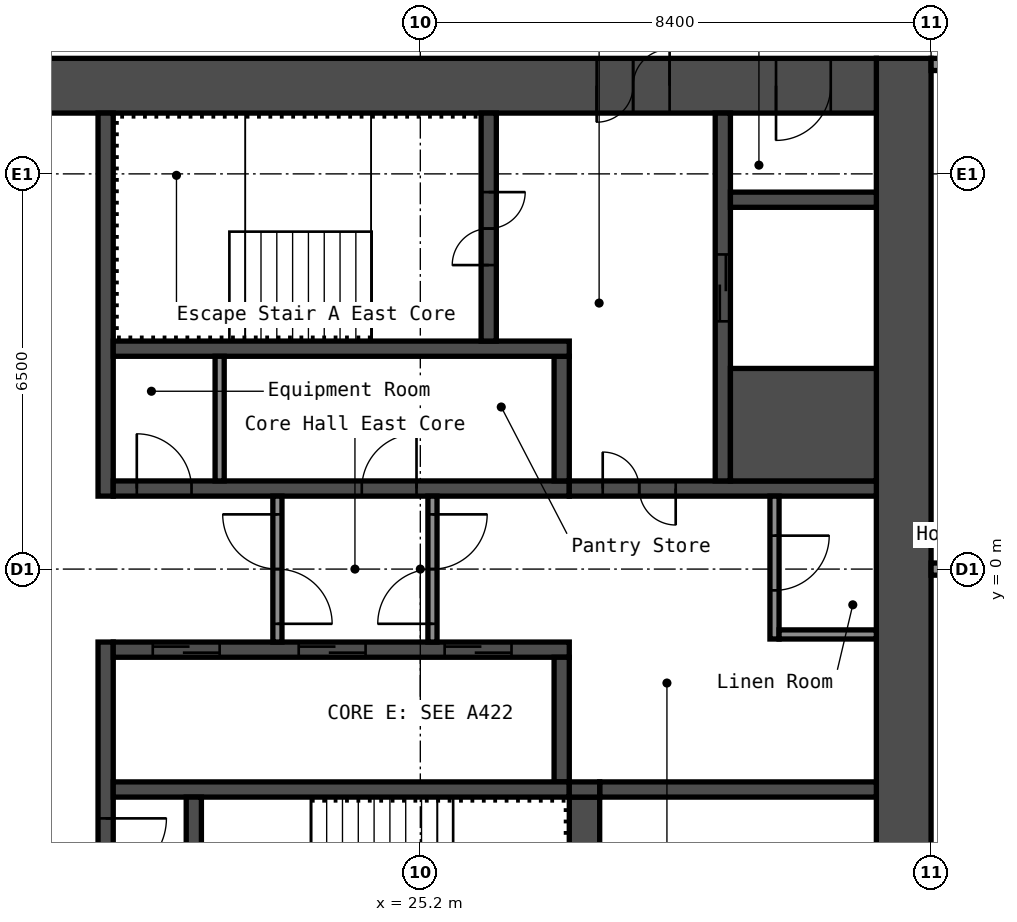
"""IFC4 building model, lengths in metres.
Left out: names, types, materials, properties, quantities, classifications, styles, units other than length and angle.
Written with IfcOpenShell. Run it as: python <this file> out.ifc"""

import sys

from ifc_helpers import new_model, si_unit, direction, frame, frame_2d, origin, place, context, subcontext, project, spatial, rectangle, extrude, element, fill, save


model = new_model("IFC4")
c1 = context("Model", 3, precision=1e-05, world=origin(), true_north=direction((0.0, 1.0)))
c2 = subcontext(c1, "Body", "Model", "MODEL_VIEW")
j1 = project(units=[si_unit("LENGTHUNIT", "METRE"), si_unit("PLANEANGLEUNIT", "RADIAN")], contexts=[c1])
p1 = place(None, origin())
s1 = spatial("IfcSite", under=j1, at=p1, CompositionType="ELEMENT")
p2 = place(p1, origin())
s2 = spatial("IfcBuilding", under=s1, at=p2, CompositionType="ELEMENT")
p3 = place(p2, frame((0.0, 0.0, 147.0)))
s3 = spatial("IfcBuildingStorey", under=s2, at=p3, CompositionType="ELEMENT", Elevation=147.0)
p4 = place(p3, frame((33.15, -8.4, 0.0), z_axis=(0.0, 0.0, 1.0), x_axis=(0.0, 1.0, 0.0)))
e1 = element("IfcWall", 1, at=p4, inside=s3, PredefinedType="SHEAR", context=c2, shape_type="SweptSolid", body=[
    extrude(rectangle(XDim=16.8, YDim=0.9, at=frame_2d((8.4, 0.0))), origin(), (0.0, 0.0, 1.0), 2.75),
])
p5 = place(p3, frame((17.7, 7.95, 0.0), z_axis=(0.0, 0.0, 1.0), x_axis=(1.0, 0.0, 0.0)))
e2 = element("IfcWall", 2, at=p5, inside=s3, PredefinedType="SHEAR", context=c2, shape_type="SweptSolid", body=[
    extrude(rectangle(XDim=15.0, YDim=0.9, at=frame_2d((7.5, 0.0))), origin(), (0.0, 0.0, 1.0), 2.75),
])
p6 = place(p5, frame((10.4, 0.0, 0.0)))
e3 = element("IfcOpeningElement", 3, at=p6, cuts=e2, PredefinedType="OPENING", context=c2, shape_type="SweptSolid", body=[
    extrude(rectangle(XDim=1.2, YDim=2.1, at=frame_2d((0.6, 1.05))), frame((0.0, 0.46, 0.0), z_axis=(0.0, -1.0, 0.0), x_axis=(1.0, 0.0, 0.0)), (0.0, 0.0, 1.0), 0.92),
])
p7 = place(p5, frame((13.35, 0.0, 0.0)))
e4 = element("IfcOpeningElement", 4, at=p7, cuts=e2, PredefinedType="OPENING", context=c2, shape_type="SweptSolid", body=[
    extrude(rectangle(XDim=0.9, YDim=2.1, at=frame_2d((0.45, 1.05))), frame((0.0, 0.46, 0.0), z_axis=(0.0, -1.0, 0.0), x_axis=(1.0, 0.0, 0.0)), (0.0, 0.0, 1.0), 0.92),
])
p8 = place(p3, frame((20.025, 1.2, 0.0), z_axis=(0.0, 0.0, 1.0), x_axis=(0.0, 1.0, 0.0)))
e5 = element("IfcWall", 5, at=p8, inside=s3, PredefinedType="SHEAR", context=c2, shape_type="SweptSolid", body=[
    extrude(rectangle(XDim=6.3, YDim=0.25, at=frame_2d((3.15, 0.0))), origin(), (0.0, 0.0, 1.0), 2.75),
])
p9 = place(p3, frame((20.025, -7.5, 0.0), z_axis=(0.0, 0.0, 1.0), x_axis=(0.0, 1.0, 0.0)))
e6 = element("IfcWall", 6, at=p9, inside=s3, PredefinedType="SHEAR", context=c2, shape_type="SweptSolid", body=[
    extrude(rectangle(XDim=6.3, YDim=0.25, at=frame_2d((3.15, 0.0))), origin(), (0.0, 0.0, 1.0), 2.75),
])
p10 = place(p9, frame((2.4, 0.0, 0.0)))
e7 = element("IfcOpeningElement", 7, at=p10, cuts=e6, PredefinedType="OPENING", context=c2, shape_type="SweptSolid", body=[
    extrude(rectangle(XDim=1.0, YDim=2.1, at=frame_2d((0.5, 1.05))), frame((0.0, 0.135, 0.0), z_axis=(0.0, -1.0, 0.0), x_axis=(1.0, 0.0, 0.0)), (0.0, 0.0, 1.0), 0.27),
])
p11 = place(p3, frame((20.15, 1.325, 0.0), z_axis=(0.0, 0.0, 1.0), x_axis=(1.0, 0.0, 0.0)))
e8 = element("IfcWall", 8, at=p11, inside=s3, PredefinedType="SHEAR", context=c2, shape_type="SweptSolid", body=[
    extrude(rectangle(XDim=7.5, YDim=0.25, at=frame_2d((3.75, 0.0))), origin(), (0.0, 0.0, 1.0), 2.75),
])
p12 = place(p11, frame((0.387, 0.0, 0.0)))
e9 = element("IfcOpeningElement", 9, at=p12, cuts=e8, PredefinedType="OPENING", context=c2, shape_type="SweptSolid", body=[
    extrude(rectangle(XDim=0.9, YDim=2.1, at=frame_2d((0.45, 1.05))), frame((0.0, 0.135, 0.0), z_axis=(0.0, -1.0, 0.0), x_axis=(1.0, 0.0, 0.0)), (0.0, 0.0, 1.0), 0.27),
])
p13 = place(p11, frame((4.087, 0.0, 0.0)))
e10 = element("IfcOpeningElement", 10, at=p13, cuts=e8, PredefinedType="OPENING", context=c2, shape_type="SweptSolid", body=[
    extrude(rectangle(XDim=0.9, YDim=2.1, at=frame_2d((0.45, 1.05))), frame((0.0, 0.135, 0.0), z_axis=(0.0, -1.0, 0.0), x_axis=(1.0, 0.0, 0.0)), (0.0, 0.0, 1.0), 0.27),
])
p14 = place(p3, frame((27.525, 1.45, 0.0), z_axis=(0.0, 0.0, 1.0), x_axis=(0.0, 1.0, 0.0)))
e11 = element("IfcWall", 11, at=p14, inside=s3, PredefinedType="SHEAR", context=c2, shape_type="SweptSolid", body=[
    extrude(rectangle(XDim=2.05, YDim=0.25, at=frame_2d((1.025, 0.0))), origin(), (0.0, 0.0, 1.0), 2.75),
])
p15 = place(p3, frame((20.15, 3.625, 0.0), z_axis=(0.0, 0.0, 1.0), x_axis=(1.0, 0.0, 0.0)))
e12 = element("IfcWall", 12, at=p15, inside=s3, PredefinedType="SHEAR", context=c2, shape_type="SweptSolid", body=[
    extrude(rectangle(XDim=7.5, YDim=0.25, at=frame_2d((3.75, 0.0))), origin(), (0.0, 0.0, 1.0), 2.75),
])
p16 = place(p3, frame((26.325, 3.75, 0.0), z_axis=(0.0, 0.0, 1.0), x_axis=(0.0, 1.0, 0.0)))
e13 = element("IfcWall", 13, at=p16, inside=s3, PredefinedType="SHEAR", context=c2, shape_type="SweptSolid", body=[
    extrude(rectangle(XDim=3.75, YDim=0.25, at=frame_2d((1.875, 0.0))), origin(), (0.0, 0.0, 1.0), 2.75),
])
p17 = place(p16, frame((1.25, 0.0, 0.0)))
e14 = element("IfcOpeningElement", 14, at=p17, cuts=e13, PredefinedType="OPENING", context=c2, shape_type="SweptSolid", body=[
    extrude(rectangle(XDim=1.2, YDim=2.1, at=frame_2d((0.6, 1.05))), frame((0.0, 0.135, 0.0), z_axis=(0.0, -1.0, 0.0), x_axis=(1.0, 0.0, 0.0)), (0.0, 0.0, 1.0), 0.27),
])
p18 = place(p3, frame((27.65, 1.325, 0.0), z_axis=(0.0, 0.0, 1.0), x_axis=(1.0, 0.0, 0.0)))
e15 = element("IfcWall", 15, at=p18, inside=s3, PredefinedType="SHEAR", context=c2, shape_type="SweptSolid", body=[
    extrude(rectangle(XDim=5.05, YDim=0.25, at=frame_2d((2.525, 0.0))), origin(), (0.0, 0.0, 1.0), 2.75),
])
p19 = place(p18, frame((0.55, 0.0, 0.0)))
e16 = element("IfcOpeningElement", 16, at=p19, cuts=e15, PredefinedType="OPENING", context=c2, shape_type="SweptSolid", body=[
    extrude(rectangle(XDim=1.2, YDim=2.1, at=frame_2d((0.6, 1.05))), frame((0.0, 0.135, 0.0), z_axis=(0.0, -1.0, 0.0), x_axis=(1.0, 0.0, 0.0)), (0.0, 0.0, 1.0), 0.27),
])
p20 = place(p3, frame((30.175, 1.45, 0.0), z_axis=(0.0, 0.0, 1.0), x_axis=(0.0, 1.0, 0.0)))
e17 = element("IfcWall", 17, at=p20, inside=s3, PredefinedType="SHEAR", context=c2, shape_type="SweptSolid", body=[
    extrude(rectangle(XDim=6.05, YDim=0.25, at=frame_2d((3.025, 0.0))), origin(), (0.0, 0.0, 1.0), 2.75),
])
p21 = place(p20, frame((2.625, 0.0, 0.0)))
e18 = element("IfcOpeningElement", 18, at=p21, cuts=e17, PredefinedType="OPENING", context=c2, shape_type="SweptSolid", body=[
    extrude(rectangle(XDim=1.1, YDim=2.1, at=frame_2d((0.55, 1.05))), frame((0.0, 0.135, 0.0), z_axis=(0.0, -1.0, 0.0), x_axis=(1.0, 0.0, 0.0)), (0.0, 0.0, 1.0), 0.27),
])
p22 = place(p3, frame((30.3, 2.375, 0.0), z_axis=(0.0, 0.0, 1.0), x_axis=(1.0, 0.0, 0.0)))
e19 = element("IfcWall", 19, at=p22, inside=s3, PredefinedType="SHEAR", context=c2, shape_type="SweptSolid", body=[
    extrude(rectangle(XDim=2.4, YDim=1.85, at=frame_2d((1.2, 0.0))), origin(), (0.0, 0.0, 1.0), 2.75),
])
p23 = place(p3, frame((30.3, 6.075, 0.0), z_axis=(0.0, 0.0, 1.0), x_axis=(1.0, 0.0, 0.0)))
e20 = element("IfcWall", 20, at=p23, inside=s3, PredefinedType="SHEAR", context=c2, shape_type="SweptSolid", body=[
    extrude(rectangle(XDim=2.4, YDim=0.25, at=frame_2d((1.2, 0.0))), origin(), (0.0, 0.0, 1.0), 2.75),
])
p24 = place(p3, frame((20.15, -1.325, 0.0), z_axis=(0.0, 0.0, 1.0), x_axis=(1.0, 0.0, 0.0)))
e21 = element("IfcWall", 21, at=p24, inside=s3, PredefinedType="SHEAR", context=c2, shape_type="SweptSolid", body=[
    extrude(rectangle(XDim=7.5, YDim=0.25, at=frame_2d((3.75, 0.0))), origin(), (0.0, 0.0, 1.0), 2.75),
])
p25 = place(p24, frame((0.65, 0.0, 0.0)))
e22 = element("IfcOpeningElement", 22, at=p25, cuts=e21, PredefinedType="OPENING", context=c2, shape_type="SweptSolid", body=[
    extrude(rectangle(XDim=1.1, YDim=2.1, at=frame_2d((0.55, 1.05))), frame((0.0, 0.135, 0.0), z_axis=(0.0, -1.0, 0.0), x_axis=(1.0, 0.0, 0.0)), (0.0, 0.0, 1.0), 0.27),
])
p26 = place(p24, frame((3.05, 0.0, 0.0)))
e23 = element("IfcOpeningElement", 23, at=p26, cuts=e21, PredefinedType="OPENING", context=c2, shape_type="SweptSolid", body=[
    extrude(rectangle(XDim=1.1, YDim=2.1, at=frame_2d((0.55, 1.05))), frame((0.0, 0.135, 0.0), z_axis=(0.0, -1.0, 0.0), x_axis=(1.0, 0.0, 0.0)), (0.0, 0.0, 1.0), 0.27),
])
p27 = place(p24, frame((5.45, 0.0, 0.0)))
e24 = element("IfcOpeningElement", 24, at=p27, cuts=e21, PredefinedType="OPENING", context=c2, shape_type="SweptSolid", body=[
    extrude(rectangle(XDim=1.1, YDim=2.1, at=frame_2d((0.55, 1.05))), frame((0.0, 0.135, 0.0), z_axis=(0.0, -1.0, 0.0), x_axis=(1.0, 0.0, 0.0)), (0.0, 0.0, 1.0), 0.27),
])
p28 = place(p3, frame((27.525, -3.5, 0.0), z_axis=(0.0, 0.0, 1.0), x_axis=(0.0, 1.0, 0.0)))
e25 = element("IfcWall", 25, at=p28, inside=s3, PredefinedType="SHEAR", context=c2, shape_type="SweptSolid", body=[
    extrude(rectangle(XDim=2.05, YDim=0.25, at=frame_2d((1.025, 0.0))), origin(), (0.0, 0.0, 1.0), 2.75),
])
p29 = place(p3, frame((20.15, -3.625, 0.0), z_axis=(0.0, 0.0, 1.0), x_axis=(1.0, 0.0, 0.0)))
e26 = element("IfcWall", 26, at=p29, inside=s3, PredefinedType="SHEAR", context=c2, shape_type="SweptSolid", body=[
    extrude(rectangle(XDim=7.5, YDim=0.25, at=frame_2d((3.75, 0.0))), origin(), (0.0, 0.0, 1.0), 2.75),
])
p30 = place(p3, frame((21.475, -7.5, 0.0), z_axis=(0.0, 0.0, 1.0), x_axis=(0.0, 1.0, 0.0)))
e27 = element("IfcWall", 27, at=p30, inside=s3, PredefinedType="SHEAR", context=c2, shape_type="SweptSolid", body=[
    extrude(rectangle(XDim=3.75, YDim=0.25, at=frame_2d((1.875, 0.0))), origin(), (0.0, 0.0, 1.0), 2.75),
])
p31 = place(p30, frame((1.3, 0.0, 0.0)))
e28 = element("IfcOpeningElement", 28, at=p31, cuts=e27, PredefinedType="OPENING", context=c2, shape_type="SweptSolid", body=[
    extrude(rectangle(XDim=1.2, YDim=2.1, at=frame_2d((0.6, 1.05))), frame((0.0, 0.135, 0.0), z_axis=(0.0, -1.0, 0.0), x_axis=(1.0, 0.0, 0.0)), (0.0, 0.0, 1.0), 0.27),
])
p32 = place(p3, frame((27.9, -7.5, 0.0), z_axis=(0.0, 0.0, 1.0), x_axis=(0.0, 1.0, 0.0)))
e29 = element("IfcWall", 29, at=p32, inside=s3, PredefinedType="SHEAR", context=c2, shape_type="SweptSolid", body=[
    extrude(rectangle(XDim=3.75, YDim=0.5, at=frame_2d((1.875, 0.0))), origin(), (0.0, 0.0, 1.0), 2.75),
])
p33 = place(p3, frame((28.15, -3.625, 0.0), z_axis=(0.0, 0.0, 1.0), x_axis=(1.0, 0.0, 0.0)))
e30 = element("IfcWall", 30, at=p33, inside=s3, PredefinedType="SHEAR", context=c2, shape_type="SweptSolid", body=[
    extrude(rectangle(XDim=4.55, YDim=0.25, at=frame_2d((2.275, 0.0))), origin(), (0.0, 0.0, 1.0), 2.75),
])
p34 = place(p3, frame((27.65, -3.625, 0.0), z_axis=(0.0, 0.0, 1.0), x_axis=(1.0, 0.0, 0.0)))
e31 = element("IfcWall", 31, at=p34, inside=s3, PredefinedType="SHEAR", context=c2, shape_type="SweptSolid", body=[
    extrude(rectangle(XDim=0.5, YDim=0.25, at=frame_2d((0.25, 0.0))), origin(), (0.0, 0.0, 1.0), 2.75),
])
p35 = place(p3, frame((22.85, -1.2, 0.0), z_axis=(0.0, 0.0, 1.0), x_axis=(0.0, 1.0, 0.0)))
e32 = element("IfcWall", 32, at=p35, inside=s3, PredefinedType="PARTITIONING", context=c2, shape_type="SweptSolid", body=[
    extrude(rectangle(XDim=2.4, YDim=0.15, at=frame_2d((1.2, 0.0))), origin(), (0.0, 0.0, 1.0), 2.75),
])
p36 = place(p35, frame((0.3, 0.0, 0.0)))
e33 = element("IfcOpeningElement", 33, at=p36, cuts=e32, PredefinedType="OPENING", context=c2, shape_type="SweptSolid", body=[
    extrude(rectangle(XDim=1.8, YDim=2.1, at=frame_2d((0.9, 1.05))), frame((0.0, 0.085, 0.0), z_axis=(0.0, -1.0, 0.0), x_axis=(1.0, 0.0, 0.0)), (0.0, 0.0, 1.0), 0.17),
])
p37 = place(p3, frame((25.4, -1.2, 0.0), z_axis=(0.0, 0.0, 1.0), x_axis=(0.0, 1.0, 0.0)))
e34 = element("IfcWall", 34, at=p37, inside=s3, PredefinedType="PARTITIONING", context=c2, shape_type="SweptSolid", body=[
    extrude(rectangle(XDim=2.4, YDim=0.15, at=frame_2d((1.2, 0.0))), origin(), (0.0, 0.0, 1.0), 2.75),
])
p38 = place(p37, frame((0.3, 0.0, 0.0)))
e35 = element("IfcOpeningElement", 35, at=p38, cuts=e34, PredefinedType="OPENING", context=c2, shape_type="SweptSolid", body=[
    extrude(rectangle(XDim=1.8, YDim=2.1, at=frame_2d((0.9, 1.05))), frame((0.0, 0.085, 0.0), z_axis=(0.0, -1.0, 0.0), x_axis=(1.0, 0.0, 0.0)), (0.0, 0.0, 1.0), 0.17),
])
p39 = place(p3, frame((31.025, -1.15, 0.0), z_axis=(0.0, 0.0, 1.0), x_axis=(0.0, 1.0, 0.0)))
e36 = element("IfcWall", 36, at=p39, inside=s3, PredefinedType="PARTITIONING", context=c2, shape_type="SweptSolid", body=[
    extrude(rectangle(XDim=2.35, YDim=0.15, at=frame_2d((1.175, 0.0))), origin(), (0.0, 0.0, 1.0), 2.75),
])
p40 = place(p39, frame((0.8, 0.0, 0.0)))
e37 = element("IfcOpeningElement", 37, at=p40, cuts=e36, PredefinedType="OPENING", context=c2, shape_type="SweptSolid", body=[
    extrude(rectangle(XDim=0.9, YDim=2.1, at=frame_2d((0.45, 1.05))), frame((0.0, 0.085, 0.0), z_axis=(0.0, -1.0, 0.0), x_axis=(1.0, 0.0, 0.0)), (0.0, 0.0, 1.0), 0.17),
])
p41 = place(p3, frame((31.1, -1.075, 0.0), z_axis=(0.0, 0.0, 1.0), x_axis=(1.0, 0.0, 0.0)))
e38 = element("IfcWall", 38, at=p41, inside=s3, PredefinedType="PARTITIONING", context=c2, shape_type="SweptSolid", body=[
    extrude(rectangle(XDim=1.6, YDim=0.15, at=frame_2d((0.8, 0.0))), origin(), (0.0, 0.0, 1.0), 2.75),
])
p42 = place(p3, frame((21.9, 1.45, 0.0), z_axis=(0.0, 0.0, 1.0), x_axis=(0.0, 1.0, 0.0)))
e39 = element("IfcWall", 39, at=p42, inside=s3, PredefinedType="PARTITIONING", context=c2, shape_type="SweptSolid", body=[
    extrude(rectangle(XDim=2.05, YDim=0.15, at=frame_2d((1.025, 0.0))), origin(), (0.0, 0.0, 1.0), 2.75),
])
p43 = place(p3, frame((33.6, 0.0, 0.0), z_axis=(0.0, 0.0, 1.0), x_axis=(1.0, 0.0, 0.0)))
e40 = element("IfcWall", 40, at=p43, inside=s3, PredefinedType="PARTITIONING", context=c2, shape_type="SweptSolid", body=[
    extrude(rectangle(XDim=6.5, YDim=0.2, at=frame_2d((3.25, 0.0))), origin(), (0.0, 0.0, 1.0), 2.75),
])
p44 = place(p3, frame((33.6, 8.3, 0.0), z_axis=(0.0, 0.0, 1.0), x_axis=(1.0, 0.0, 0.0)))
e41 = element("IfcWall", 41, at=p44, inside=s3, PredefinedType="PARTITIONING", context=c2, shape_type="SweptSolid", body=[
    extrude(rectangle(XDim=6.6, YDim=0.2, at=frame_2d((3.3, 0.0))), origin(), (0.0, 0.0, 1.0), 2.75),
])
p45 = place(p44, frame((1.595, 0.0, 0.0)))
e42 = element("IfcOpeningElement", 42, at=p45, cuts=e41, PredefinedType="OPENING", context=c2, shape_type="SweptSolid", body=[
    extrude(rectangle(XDim=0.9, YDim=2.1, at=frame_2d((0.45, 1.05))), frame((0.0, 0.11, 0.0), z_axis=(0.0, -1.0, 0.0), x_axis=(1.0, 0.0, 0.0)), (0.0, 0.0, 1.0), 0.22),
])
p46 = place(p44, frame((4.895, 0.0, 0.0)))
e43 = element("IfcOpeningElement", 43, at=p46, cuts=e41, PredefinedType="OPENING", context=c2, shape_type="SweptSolid", body=[
    extrude(rectangle(XDim=0.9, YDim=2.1, at=frame_2d((0.45, 1.05))), frame((0.0, 0.11, 0.0), z_axis=(0.0, -1.0, 0.0), x_axis=(1.0, 0.0, 0.0)), (0.0, 0.0, 1.0), 0.22),
])
p47 = place(p6, origin())
e44 = element("IfcDoor", 44, at=p47, inside=s3, OperationType="DOUBLE_DOOR_SINGLE_SWING", PredefinedType="DOOR", context=c2, shape_type="SweptSolid", body=[
    extrude(rectangle(XDim=1.2, YDim=2.1, at=frame_2d((0.6, 1.05))), frame((0.0, 0.025, 0.0), z_axis=(0.0, -1.0, 0.0), x_axis=(1.0, 0.0, 0.0)), (0.0, 0.0, 1.0), 0.05),
])
fill(e3, e44)
p48 = place(p7, origin())
e45 = element("IfcDoor", 45, at=p48, inside=s3, OperationType="SINGLE_SWING_LEFT", PredefinedType="DOOR", context=c2, shape_type="SweptSolid", body=[
    extrude(rectangle(XDim=0.9, YDim=2.1, at=frame_2d((0.45, 1.05))), frame((0.0, 0.025, 0.0), z_axis=(0.0, -1.0, 0.0), x_axis=(1.0, 0.0, 0.0)), (0.0, 0.0, 1.0), 0.05),
])
fill(e4, e45)
p49 = place(p17, origin())
e46 = element("IfcDoor", 46, at=p49, inside=s3, OperationType="DOUBLE_DOOR_SINGLE_SWING", PredefinedType="DOOR", context=c2, shape_type="SweptSolid", body=[
    extrude(rectangle(XDim=1.2, YDim=2.1, at=frame_2d((0.6, 1.05))), frame((0.0, 0.025, 0.0), z_axis=(0.0, -1.0, 0.0), x_axis=(1.0, 0.0, 0.0)), (0.0, 0.0, 1.0), 0.05),
])
fill(e14, e46)
p50 = place(p10, origin())
e47 = element("IfcDoor", 47, at=p50, inside=s3, OperationType="SINGLE_SWING_RIGHT", PredefinedType="DOOR", context=c2, shape_type="SweptSolid", body=[
    extrude(rectangle(XDim=1.0, YDim=2.1, at=frame_2d((0.5, 1.05))), frame((0.0, 0.025, 0.0), z_axis=(0.0, -1.0, 0.0), x_axis=(1.0, 0.0, 0.0)), (0.0, 0.0, 1.0), 0.05),
])
fill(e7, e47)
p51 = place(p19, origin())
e48 = element("IfcDoor", 48, at=p51, inside=s3, OperationType="DOUBLE_DOOR_SINGLE_SWING", PredefinedType="DOOR", context=c2, shape_type="SweptSolid", body=[
    extrude(rectangle(XDim=1.2, YDim=2.1, at=frame_2d((0.6, 1.05))), frame((0.0, 0.025, 0.0), z_axis=(0.0, -1.0, 0.0), x_axis=(1.0, 0.0, 0.0)), (0.0, 0.0, 1.0), 0.05),
])
fill(e16, e48)
p52 = place(p36, origin())
e49 = element("IfcDoor", 49, at=p52, inside=s3, OperationType="DOUBLE_DOOR_SINGLE_SWING", PredefinedType="DOOR", context=c2, shape_type="SweptSolid", body=[
    extrude(rectangle(XDim=1.8, YDim=2.1, at=frame_2d((0.9, 1.05))), frame((0.0, 0.025, 0.0), z_axis=(0.0, -1.0, 0.0), x_axis=(1.0, 0.0, 0.0)), (0.0, 0.0, 1.0), 0.05),
])
fill(e33, e49)
p53 = place(p38, origin())
e50 = element("IfcDoor", 50, at=p53, inside=s3, OperationType="DOUBLE_DOOR_SINGLE_SWING", PredefinedType="DOOR", context=c2, shape_type="SweptSolid", body=[
    extrude(rectangle(XDim=1.8, YDim=2.1, at=frame_2d((0.9, 1.05))), frame((0.0, 0.025, 0.0), z_axis=(0.0, -1.0, 0.0), x_axis=(1.0, 0.0, 0.0)), (0.0, 0.0, 1.0), 0.05),
])
fill(e35, e50)
p54 = place(p40, origin())
e51 = element("IfcDoor", 51, at=p54, inside=s3, OperationType="SINGLE_SWING_RIGHT", PredefinedType="DOOR", context=c2, shape_type="SweptSolid", body=[
    extrude(rectangle(XDim=0.9, YDim=2.1, at=frame_2d((0.45, 1.05))), frame((0.0, 0.025, 0.0), z_axis=(0.0, -1.0, 0.0), x_axis=(1.0, 0.0, 0.0)), (0.0, 0.0, 1.0), 0.05),
])
fill(e37, e51)
p55 = place(p12, origin())
e52 = element("IfcDoor", 52, at=p55, inside=s3, OperationType="SINGLE_SWING_RIGHT", PredefinedType="DOOR", context=c2, shape_type="SweptSolid", body=[
    extrude(rectangle(XDim=0.9, YDim=2.1, at=frame_2d((0.45, 1.05))), frame((0.0, 0.025, 0.0), z_axis=(0.0, -1.0, 0.0), x_axis=(1.0, 0.0, 0.0)), (0.0, 0.0, 1.0), 0.05),
])
fill(e9, e52)
p56 = place(p13, origin())
e53 = element("IfcDoor", 53, at=p56, inside=s3, OperationType="SINGLE_SWING_LEFT", PredefinedType="DOOR", context=c2, shape_type="SweptSolid", body=[
    extrude(rectangle(XDim=0.9, YDim=2.1, at=frame_2d((0.45, 1.05))), frame((0.0, 0.025, 0.0), z_axis=(0.0, -1.0, 0.0), x_axis=(1.0, 0.0, 0.0)), (0.0, 0.0, 1.0), 0.05),
])
fill(e10, e53)
p57 = place(p25, origin())
e54 = element("IfcDoor", 54, at=p57, inside=s3, OperationType="DOUBLE_DOOR_SLIDING", PredefinedType="DOOR", context=c2, shape_type="SweptSolid", body=[
    extrude(rectangle(XDim=1.1, YDim=2.1, at=frame_2d((0.55, 1.05))), frame((0.0, 0.025, 0.0), z_axis=(0.0, -1.0, 0.0), x_axis=(1.0, 0.0, 0.0)), (0.0, 0.0, 1.0), 0.05),
])
fill(e22, e54)
p58 = place(p26, origin())
e55 = element("IfcDoor", 55, at=p58, inside=s3, OperationType="DOUBLE_DOOR_SLIDING", PredefinedType="DOOR", context=c2, shape_type="SweptSolid", body=[
    extrude(rectangle(XDim=1.1, YDim=2.1, at=frame_2d((0.55, 1.05))), frame((0.0, 0.025, 0.0), z_axis=(0.0, -1.0, 0.0), x_axis=(1.0, 0.0, 0.0)), (0.0, 0.0, 1.0), 0.05),
])
fill(e23, e55)
p59 = place(p27, origin())
e56 = element("IfcDoor", 56, at=p59, inside=s3, OperationType="DOUBLE_DOOR_SLIDING", PredefinedType="DOOR", context=c2, shape_type="SweptSolid", body=[
    extrude(rectangle(XDim=1.1, YDim=2.1, at=frame_2d((0.55, 1.05))), frame((0.0, 0.025, 0.0), z_axis=(0.0, -1.0, 0.0), x_axis=(1.0, 0.0, 0.0)), (0.0, 0.0, 1.0), 0.05),
])
fill(e24, e56)
p60 = place(p21, origin())
e57 = element("IfcDoor", 57, at=p60, inside=s3, OperationType="DOUBLE_DOOR_SLIDING", PredefinedType="DOOR", context=c2, shape_type="SweptSolid", body=[
    extrude(rectangle(XDim=1.1, YDim=2.1, at=frame_2d((0.55, 1.05))), frame((0.0, 0.025, 0.0), z_axis=(0.0, -1.0, 0.0), x_axis=(1.0, 0.0, 0.0)), (0.0, 0.0, 1.0), 0.05),
])
fill(e18, e57)
save(model, sys.argv[1])
